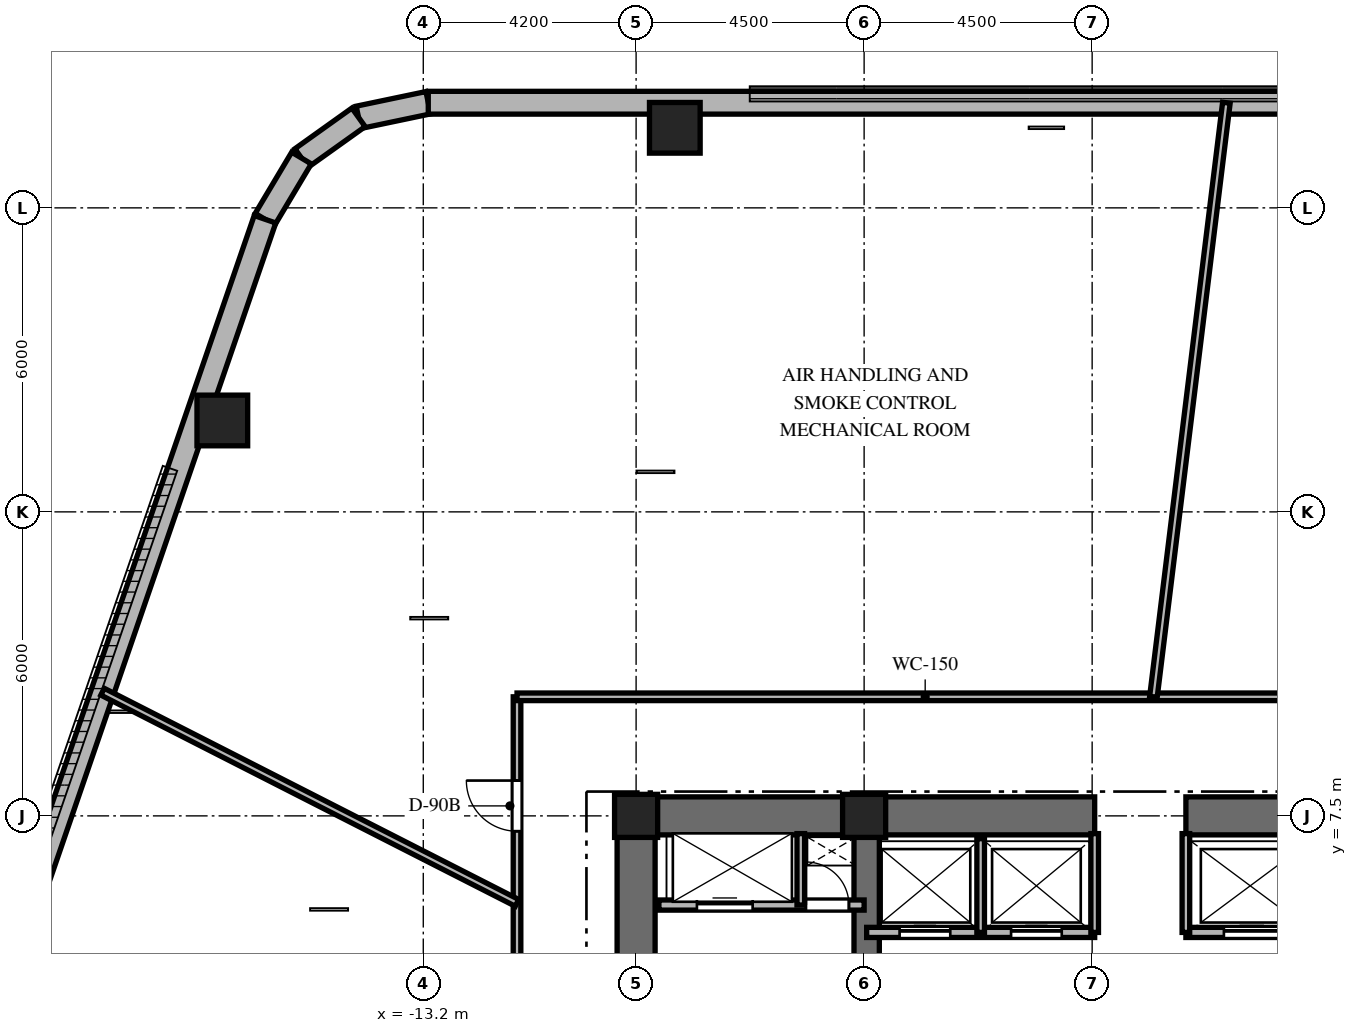
"""IFC4 building model, lengths in metres.
Left out: names, types, materials, properties, quantities, classifications, styles, units other than length and angle.
Written with IfcOpenShell. Run it as: python <this file> out.ifc"""

import sys

from ifc_helpers import new_model, si_unit, direction, frame, frame_2d, origin, origin_2d, place, context, subcontext, project, spatial, rectangle, extrude, element, fill, save


model = new_model("IFC4")
c1 = context("Model", 3, precision=1e-05, world=origin(), true_north=direction((0.0, 1.0)))
c2 = subcontext(c1, "Body", "Model", "MODEL_VIEW")
j1 = project(units=[si_unit("LENGTHUNIT", "METRE"), si_unit("PLANEANGLEUNIT", "RADIAN")], contexts=[c1])
p1 = place(None, origin())
s1 = spatial("IfcSite", under=j1, at=p1, CompositionType="ELEMENT")
p2 = place(p1, origin())
s2 = spatial("IfcBuilding", under=s1, at=p2, CompositionType="ELEMENT")
p3 = place(p2, frame((0.0, 0.0, 255.9)))
s3 = spatial("IfcBuildingStorey", under=s2, at=p3, CompositionType="ELEMENT", Elevation=255.9)
p4 = place(p3, frame((-9.375, 7.5, 0.0), z_axis=(0.0, 0.0, 1.0), x_axis=(1.0, 0.0, 0.0)))
e1 = element("IfcWall", 1, at=p4, inside=s3, PredefinedType="SHEAR", context=c2, shape_type="SweptSolid", body=[
    extrude(rectangle(XDim=9.425, YDim=0.75, at=frame_2d((4.712, 0.0))), origin(), (0.0, 0.0, 1.0), 5.4),
])
p5 = place(p3, frame((1.85, 7.5, 0.0), z_axis=(0.0, 0.0, 1.0), x_axis=(1.0, 0.0, 0.0)))
e2 = element("IfcWall", 2, at=p5, inside=s3, PredefinedType="SHEAR", context=c2, shape_type="SweptSolid", body=[
    extrude(rectangle(XDim=7.525, YDim=0.75, at=frame_2d((3.762, 0.0))), origin(), (0.0, 0.0, 1.0), 5.4),
])
p6 = place(p3, frame((-9.0, -7.125, 0.0), z_axis=(0.0, 0.0, 1.0), x_axis=(0.0, 1.0, 0.0)))
e3 = element("IfcWall", 3, at=p6, inside=s3, PredefinedType="SHEAR", context=c2, shape_type="SweptSolid", body=[
    extrude(rectangle(XDim=14.25, YDim=0.75, at=frame_2d((7.125, 0.0))), origin(), (0.0, 0.0, 1.0), 5.4),
])
p7 = place(p6, frame((10.25, 0.0, 0.0)))
e4 = element("IfcOpeningElement", 4, at=p7, cuts=e3, PredefinedType="OPENING", context=c2, shape_type="SweptSolid", body=[
    extrude(rectangle(XDim=1.05, YDim=2.15, at=frame_2d((0.525, 1.075))), frame((0.0, 0.385, 0.0), z_axis=(0.0, -1.0, 0.0), x_axis=(1.0, 0.0, 0.0)), (0.0, 0.0, 1.0), 0.77),
])
p8 = place(p3, frame((-4.45, 2.25, 0.0), z_axis=(0.0, 0.0, 1.0), x_axis=(0.0, 1.0, 0.0)))
e5 = element("IfcWall", 5, at=p8, inside=s3, PredefinedType="SHEAR", context=c2, shape_type="SweptSolid", body=[
    extrude(rectangle(XDim=4.875, YDim=0.5, at=frame_2d((2.438, 0.0))), origin(), (0.0, 0.0, 1.0), 5.4),
])
for number, where, z_axis, x_axis in (
    (6, (-4.5, 7.5, 0.0), (0.0, 0.0, 1.0), (1.0, 0.0, 0.0)),
    (7, (-9.0, 7.5, 0.0), (0.0, 0.0, 1.0), (1.0, 0.0, 0.0)),
):
    element("IfcColumn", number, at=place(p3, frame(where, z_axis=z_axis, x_axis=x_axis)), inside=s3, PredefinedType="COLUMN", context=c2, shape_type="SweptSolid", body=[
        extrude(rectangle(XDim=0.85, YDim=0.85, at=origin_2d()), origin(), (0.0, 0.0, 1.0), 5.4),
    ])
for number, where, z_axis, x_axis in (
    (8, (-8.236, 21.08, 0.0), (0.0, 0.0, 1.0), (1.0, 0.0, 0.0)),
    (9, (-17.166, 15.304, 0.0), (0.0, 0.0, 1.0), (1.0, 0.0, 0.0)),
):
    element("IfcColumn", number, at=place(p3, frame(where, z_axis=z_axis, x_axis=x_axis)), inside=s3, PredefinedType="COLUMN", context=c2, shape_type="SweptSolid", body=[
        extrude(rectangle(XDim=1.0, YDim=1.0, at=origin_2d()), origin(), (0.0, 0.0, 1.0), 5.4),
    ])
p9 = place(p3, frame((-13.102, 21.575, 0.0), z_axis=(0.0, 0.0, 1.0), x_axis=(-0.978757421505, -0.205021730188, 0.0)))
e10 = element("IfcWall", 10, at=p9, inside=s3, PredefinedType="SOLIDWALL", context=c2, shape_type="SweptSolid", body=[
    extrude(rectangle(XDim=1.406, YDim=0.45, at=frame_2d((0.703, 0.0))), origin(), (0.0, 0.0, 1.0), 5.1),
])
p10 = place(p3, frame((-14.478, 21.287, 0.0), z_axis=(0.0, 0.0, 1.0), x_axis=(-0.813888518617, -0.58102106611, 0.0)))
e11 = element("IfcWall", 11, at=p10, inside=s3, PredefinedType="SOLIDWALL", context=c2, shape_type="SweptSolid", body=[
    extrude(rectangle(XDim=1.383, YDim=0.45, at=frame_2d((0.691, 0.0))), origin(), (0.0, 0.0, 1.0), 5.1),
])
p11 = place(p3, frame((-15.604, 20.483, 0.0), z_axis=(0.0, 0.0, 1.0), x_axis=(-0.512222149036, -0.858852996756, 0.0)))
e12 = element("IfcWall", 12, at=p11, inside=s3, PredefinedType="SOLIDWALL", context=c2, shape_type="SweptSolid", body=[
    extrude(rectangle(XDim=1.406, YDim=0.45, at=frame_2d((0.703, 0.0))), origin(), (0.0, 0.0, 1.0), 5.1),
])
p12 = place(p3, frame((11.298, 21.575, 0.0), z_axis=(0.0, 0.0, 1.0), x_axis=(-1.0, 0.0, 0.0)))
e13 = element("IfcWall", 13, at=p12, inside=s3, PredefinedType="SOLIDWALL", context=c2, shape_type="SweptSolid", body=[
    extrude(rectangle(XDim=24.399, YDim=0.45, at=frame_2d((12.2, 0.0))), origin(), (0.0, 0.0, 1.0), 5.1),
])
p13 = place(p3, frame((-16.324, 19.275, 0.0), z_axis=(0.0, 0.0, 1.0), x_axis=(-0.325083142304, -0.945685439557, 0.0)))
e14 = element("IfcWall", 14, at=p13, inside=s3, PredefinedType="SOLIDWALL", context=c2, shape_type="SweptSolid", body=[
    extrude(rectangle(XDim=20.224, YDim=0.45, at=frame_2d((10.112, 0.0))), origin(), (0.0, 0.0, 1.0), 5.1),
])
p14 = place(p3, frame((-8.55, 5.74, 0.0), z_axis=(0.0, 0.0, 1.0), x_axis=(1.0, 0.0, 0.0)))
e15 = element("IfcWall", 15, at=p14, inside=s3, PredefinedType="PARTITIONING", context=c2, shape_type="SweptSolid", body=[
    extrude(rectangle(XDim=4.05, YDim=0.2, at=frame_2d((2.025, 0.0))), origin(), (0.0, 0.0, 1.0), 5.1),
])
p15 = place(p14, frame((0.75, 0.0, 0.0)))
e16 = element("IfcOpeningElement", 16, at=p15, cuts=e15, PredefinedType="OPENING", context=c2, shape_type="SweptSolid", body=[
    extrude(rectangle(XDim=1.1, YDim=2.2, at=frame_2d((0.55, 1.1))), frame((0.0, 0.11, 0.0), z_axis=(0.0, -1.0, 0.0), x_axis=(1.0, 0.0, 0.0)), (0.0, 0.0, 1.0), 0.22),
])
p16 = place(p14, frame((2.9, 0.0, 0.0)))
e17 = element("IfcOpeningElement", 17, at=p16, cuts=e15, PredefinedType="OPENING", context=c2, shape_type="SweptSolid", body=[
    extrude(rectangle(XDim=0.85, YDim=2.03, at=frame_2d((0.425, 1.015))), frame((0.0, 0.11, 0.0), z_axis=(0.0, -1.0, 0.0), x_axis=(1.0, 0.0, 0.0)), (0.0, 0.0, 1.0), 0.22),
])
p17 = place(p3, frame((-5.75, 5.74, 0.0), z_axis=(0.0, 0.0, 1.0), x_axis=(0.0, 1.0, 0.0)))
e18 = element("IfcWall", 18, at=p17, inside=s3, PredefinedType="PARTITIONING", context=c2, shape_type="SweptSolid", body=[
    extrude(rectangle(XDim=1.41, YDim=0.15, at=frame_2d((0.705, 0.0))), origin(), (0.0, 0.0, 1.0), 5.1),
])
p18 = place(p3, frame((-4.45, 5.2, 0.0), z_axis=(0.0, 0.0, 1.0), x_axis=(1.0, 0.0, 0.0)))
e19 = element("IfcWall", 19, at=p18, inside=s3, PredefinedType="PARTITIONING", context=c2, shape_type="SweptSolid", body=[
    extrude(rectangle(XDim=4.5, YDim=0.2, at=frame_2d((2.25, 0.0))), origin(), (0.0, 0.0, 1.0), 5.1),
])
p19 = place(p18, frame((0.65, 0.0, 0.0)))
e20 = element("IfcOpeningElement", 20, at=p19, cuts=e19, PredefinedType="OPENING", context=c2, shape_type="SweptSolid", body=[
    extrude(rectangle(XDim=1.0, YDim=2.2, at=frame_2d((0.5, 1.1))), frame((0.0, 0.11, 0.0), z_axis=(0.0, -1.0, 0.0), x_axis=(1.0, 0.0, 0.0)), (0.0, 0.0, 1.0), 0.22),
])
p20 = place(p18, frame((2.85, 0.0, 0.0)))
e21 = element("IfcOpeningElement", 21, at=p20, cuts=e19, PredefinedType="OPENING", context=c2, shape_type="SweptSolid", body=[
    extrude(rectangle(XDim=1.0, YDim=2.2, at=frame_2d((0.5, 1.1))), frame((0.0, 0.11, 0.0), z_axis=(0.0, -1.0, 0.0), x_axis=(1.0, 0.0, 0.0)), (0.0, 0.0, 1.0), 0.22),
])
p21 = place(p3, frame((1.85, 5.2, 0.0), z_axis=(0.0, 0.0, 1.0), x_axis=(1.0, 0.0, 0.0)))
e22 = element("IfcWall", 22, at=p21, inside=s3, PredefinedType="PARTITIONING", context=c2, shape_type="SweptSolid", body=[
    extrude(rectangle(XDim=2.6, YDim=0.2, at=frame_2d((1.3, 0.0))), origin(), (0.0, 0.0, 1.0), 5.1),
])
p22 = place(p21, frame((0.75, 0.0, 0.0)))
e23 = element("IfcOpeningElement", 23, at=p22, cuts=e22, PredefinedType="OPENING", context=c2, shape_type="SweptSolid", body=[
    extrude(rectangle(XDim=1.1, YDim=2.2, at=frame_2d((0.55, 1.1))), frame((0.0, 0.11, 0.0), z_axis=(0.0, -1.0, 0.0), x_axis=(1.0, 0.0, 0.0)), (0.0, 0.0, 1.0), 0.22),
])
p23 = place(p3, frame((-2.2, 5.2, 0.0), z_axis=(0.0, 0.0, 1.0), x_axis=(0.0, 1.0, 0.0)))
e24 = element("IfcWall", 24, at=p23, inside=s3, PredefinedType="PARTITIONING", context=c2, shape_type="SweptSolid", body=[
    extrude(rectangle(XDim=1.85, YDim=0.15, at=frame_2d((0.925, 0.0))), origin(), (0.0, 0.0, 1.0), 5.1),
])
for number, where, z_axis, x_axis in (
    (25, (0.05, 5.2, 0.0), (0.0, 0.0, 1.0), (0.0, 1.0, 0.0)),
    (26, (1.85, 5.2, 0.0), (0.0, 0.0, 1.0), (0.0, 1.0, 0.0)),
):
    element("IfcWall", number, at=place(p3, frame(where, z_axis=z_axis, x_axis=x_axis)), inside=s3, PredefinedType="PARTITIONING", context=c2, shape_type="SweptSolid", body=[
        extrude(rectangle(XDim=1.95, YDim=0.15, at=frame_2d((0.975, 0.0))), origin(), (0.0, 0.0, 1.0), 5.1),
    ])
p24 = place(p3, frame((-11.35, -9.85, 0.0), z_axis=(0.0, 0.0, 1.0), x_axis=(0.0, 1.0, 0.0)))
e27 = element("IfcWall", 27, at=p24, inside=s3, PredefinedType="PARTITIONING", context=c2, shape_type="SweptSolid", body=[
    extrude(rectangle(XDim=19.7, YDim=0.15, at=frame_2d((9.85, 0.0))), origin(), (0.0, 0.0, 1.0), 3.29),
])
p25 = place(p24, frame((10.825, 0.0, 0.0)))
e28 = element("IfcOpeningElement", 28, at=p25, cuts=e27, PredefinedType="OPENING", context=c2, shape_type="SweptSolid", body=[
    extrude(rectangle(XDim=1.05, YDim=2.15, at=frame_2d((0.525, 1.075))), frame((0.0, 0.085, 0.0), z_axis=(0.0, -1.0, 0.0), x_axis=(1.0, 0.0, 0.0)), (0.0, 0.0, 1.0), 0.17),
])
p26 = place(p24, frame((17.047, 0.0, 0.0)))
e29 = element("IfcOpeningElement", 29, at=p26, cuts=e27, PredefinedType="OPENING", context=c2, shape_type="SweptSolid", body=[
    extrude(rectangle(XDim=1.0, YDim=2.15, at=frame_2d((0.5, 1.075))), frame((0.0, 0.085, 0.0), z_axis=(0.0, -1.0, 0.0), x_axis=(1.0, 0.0, 0.0)), (0.0, 0.0, 1.0), 0.17),
])
p27 = place(p24, frame((5.929, 0.0, 0.0)))
e30 = element("IfcOpeningElement", 30, at=p27, cuts=e27, PredefinedType="OPENING", context=c2, shape_type="SweptSolid", body=[
    extrude(rectangle(XDim=1.0, YDim=2.15, at=frame_2d((0.5, 1.075))), frame((0.0, 0.085, 0.0), z_axis=(0.0, -1.0, 0.0), x_axis=(1.0, 0.0, 0.0)), (0.0, 0.0, 1.0), 0.17),
])
p28 = place(p3, frame((-11.35, 9.85, 0.0), z_axis=(0.0, 0.0, 1.0), x_axis=(1.0, 0.0, 0.0)))
e31 = element("IfcWall", 31, at=p28, inside=s3, PredefinedType="PARTITIONING", context=c2, shape_type="SweptSolid", body=[
    extrude(rectangle(XDim=22.7, YDim=0.15, at=frame_2d((11.35, 0.0))), origin(), (0.0, 0.0, 1.0), 3.29),
])
p29 = place(p28, frame((17.01, 0.0, 0.0)))
e32 = element("IfcOpeningElement", 32, at=p29, cuts=e31, PredefinedType="OPENING", context=c2, shape_type="SweptSolid", body=[
    extrude(rectangle(XDim=1.0, YDim=2.15, at=frame_2d((0.5, 1.075))), frame((0.0, 0.085, 0.0), z_axis=(0.0, -1.0, 0.0), x_axis=(1.0, 0.0, 0.0)), (0.0, 0.0, 1.0), 0.17),
])
p30 = place(p3, frame((1.209, 9.85, 0.0), z_axis=(0.0, 0.0, 1.0), x_axis=(0.121874870468, 0.992545472988, 0.0)))
e33 = element("IfcWall", 33, at=p30, inside=s3, PredefinedType="PARTITIONING", context=c2, shape_type="SweptSolid", body=[
    extrude(rectangle(XDim=11.813, YDim=0.15, at=frame_2d((5.906, 0.0))), origin(), (0.0, 0.0, 1.0), 3.29),
])
p31 = place(p3, frame((-11.35, 5.783, 0.0), z_axis=(0.0, 0.0, 1.0), x_axis=(-0.891007832475, 0.453987932074, 0.0)))
e34 = element("IfcWall", 34, at=p31, inside=s3, PredefinedType="PARTITIONING", context=c2, shape_type="SweptSolid", body=[
    extrude(rectangle(XDim=9.18, YDim=0.15, at=frame_2d((4.59, 0.0))), origin(), (0.0, 0.0, 1.0), 3.29),
])
p32 = place(p15, origin())
e35 = element("IfcDoor", 35, at=p32, inside=s3, OperationType="SLIDING_TO_LEFT", PredefinedType="DOOR", context=c2, shape_type="SweptSolid", body=[
    extrude(rectangle(XDim=1.1, YDim=2.2, at=frame_2d((0.55, 1.1))), frame((0.0, 0.025, 0.0), z_axis=(0.0, -1.0, 0.0), x_axis=(1.0, 0.0, 0.0)), (0.0, 0.0, 1.0), 0.05),
])
fill(e16, e35)
p33 = place(p16, origin())
e36 = element("IfcDoor", 36, at=p33, inside=s3, OperationType="SINGLE_SWING_LEFT", PredefinedType="DOOR", context=c2, shape_type="SweptSolid", body=[
    extrude(rectangle(XDim=0.85, YDim=2.03, at=frame_2d((0.425, 1.015))), frame((0.0, 0.025, 0.0), z_axis=(0.0, -1.0, 0.0), x_axis=(1.0, 0.0, 0.0)), (0.0, 0.0, 1.0), 0.05),
])
fill(e17, e36)
p34 = place(p19, origin())
e37 = element("IfcDoor", 37, at=p34, inside=s3, OperationType="SLIDING_TO_LEFT", PredefinedType="DOOR", context=c2, shape_type="SweptSolid", body=[
    extrude(rectangle(XDim=1.0, YDim=2.2, at=frame_2d((0.5, 1.1))), frame((0.0, 0.025, 0.0), z_axis=(0.0, -1.0, 0.0), x_axis=(1.0, 0.0, 0.0)), (0.0, 0.0, 1.0), 0.05),
])
fill(e20, e37)
p35 = place(p20, origin())
e38 = element("IfcDoor", 38, at=p35, inside=s3, OperationType="SLIDING_TO_RIGHT", PredefinedType="DOOR", context=c2, shape_type="SweptSolid", body=[
    extrude(rectangle(XDim=1.0, YDim=2.2, at=frame_2d((0.5, 1.1))), frame((0.0, 0.025, 0.0), z_axis=(0.0, -1.0, 0.0), x_axis=(1.0, 0.0, 0.0)), (0.0, 0.0, 1.0), 0.05),
])
fill(e21, e38)
p36 = place(p22, origin())
e39 = element("IfcDoor", 39, at=p36, inside=s3, OperationType="SLIDING_TO_RIGHT", PredefinedType="DOOR", context=c2, shape_type="SweptSolid", body=[
    extrude(rectangle(XDim=1.1, YDim=2.2, at=frame_2d((0.55, 1.1))), frame((0.0, 0.025, 0.0), z_axis=(0.0, -1.0, 0.0), x_axis=(1.0, 0.0, 0.0)), (0.0, 0.0, 1.0), 0.05),
])
fill(e23, e39)
p37 = place(p26, origin())
e40 = element("IfcDoor", 40, at=p37, inside=s3, OperationType="SINGLE_SWING_RIGHT", PredefinedType="DOOR", context=c2, shape_type="SweptSolid", body=[
    extrude(rectangle(XDim=1.0, YDim=2.15, at=frame_2d((0.5, 1.075))), frame((0.0, 0.025, 0.0), z_axis=(0.0, -1.0, 0.0), x_axis=(1.0, 0.0, 0.0)), (0.0, 0.0, 1.0), 0.05),
])
fill(e29, e40)
save(model, sys.argv[1])
